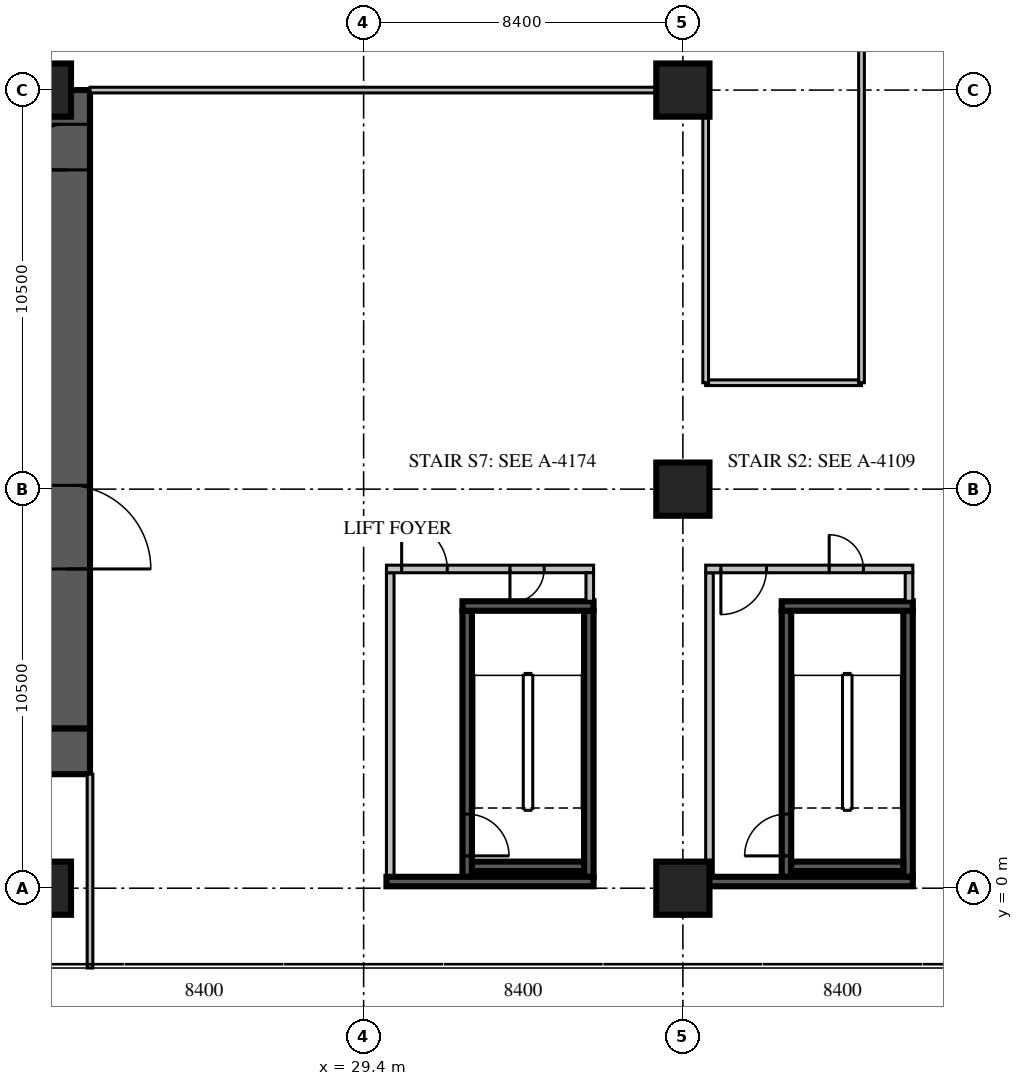
"""IFC4 building model, lengths in metres.
Left out: names, types, materials, properties, quantities, classifications, styles, units other than length and angle.
Written with IfcOpenShell. Run it as: python <this file> out.ifc"""

import sys

from ifc_helpers import new_model, si_unit, direction, frame, frame_2d, origin, origin_2d, place, context, subcontext, project, spatial, rectangle, extrude, source, transform, mapped, element, fill, save


model = new_model("IFC4")
c1 = context("Model", 3, precision=1e-05, world=origin(), true_north=direction((0.0, 1.0)))
c2 = subcontext(c1, "Body", "Model", "MODEL_VIEW")
j1 = project(units=[si_unit("LENGTHUNIT", "METRE"), si_unit("PLANEANGLEUNIT", "RADIAN")], contexts=[c1])
p1 = place(None, origin())
s1 = spatial("IfcSite", under=j1, at=p1, CompositionType="ELEMENT")
p2 = place(p1, origin())
s2 = spatial("IfcBuilding", under=s1, at=p2, CompositionType="ELEMENT")
p3 = place(p2, frame((0.0, 0.0, 12.9)))
s3 = spatial("IfcBuildingStorey", under=s2, at=p3, CompositionType="ELEMENT", Elevation=12.9)
m1 = source(origin(), c2, "Body", "SweptSolid", [
    extrude(rectangle(XDim=1.4, YDim=1.4, at=origin_2d()), origin(), (0.0, 0.0, 1.0), 5.4),
])
for number, where, z_axis, x_axis in (
    (1, (21.0, 0.0, 0.0), (0.0, 0.0, 1.0), (1.0, 0.0, 0.0)),
    (2, (21.0, 21.0, 0.0), (0.0, 0.0, 1.0), (1.0, 0.0, 0.0)),
    (3, (37.8, 0.0, 0.0), (0.0, 0.0, 1.0), (1.0, 0.0, 0.0)),
    (4, (37.8, 10.5, 0.0), (0.0, 0.0, 1.0), (1.0, 0.0, 0.0)),
    (5, (37.8, 21.0, 0.0), (0.0, 0.0, 1.0), (1.0, 0.0, 0.0)),
):
    element("IfcColumn", number, at=place(p3, frame(where, z_axis=z_axis, x_axis=x_axis)), inside=s3, PredefinedType="COLUMN", context=c2, shape_type="MappedRepresentation", body=[
        mapped(m1, transform((0.0, 0.0, 0.0), scale=1.0)),
    ])
m2 = source(origin(), c2, "Body", "SweptSolid", [
    extrude(rectangle(XDim=16.8, YDim=1.2, at=frame_2d((8.4, 0.0))), origin(), (0.0, 0.0, 1.0), 5.4),
])
p4 = place(p3, frame((21.6, 4.2, 0.0), z_axis=(0.0, 0.0, 1.0), x_axis=(0.0, 1.0, 0.0)))
e6 = element("IfcWall", 6, at=p4, inside=s3, PredefinedType="SHEAR", context=c2, shape_type="MappedRepresentation", body=[
    mapped(m2, transform((0.0, 0.0, 0.0), scale=1.0)),
])
m3 = source(origin(), c2, "Body", "SweptSolid", [
    extrude(rectangle(XDim=2.2, YDim=2.1, at=frame_2d((1.1, 1.05))), frame((0.0, 0.61, 0.0), z_axis=(0.0, -1.0, 0.0), x_axis=(1.0, 0.0, 0.0)), (0.0, 0.0, 1.0), 1.22),
])
p5 = place(p4, frame((4.2, 0.0, 0.0)))
e7 = element("IfcOpeningElement", 7, at=p5, cuts=e6, PredefinedType="OPENING", context=c2, shape_type="MappedRepresentation", body=[
    mapped(m3, transform((0.0, 0.0, 0.0), scale=1.0)),
])
m4 = source(origin(), c2, "Body", "SweptSolid", [
    extrude(rectangle(XDim=1.2, YDim=2.1, at=frame_2d((0.6, 1.05))), frame((0.0, 0.61, 0.0), z_axis=(0.0, -1.0, 0.0), x_axis=(1.0, 0.0, 0.0)), (0.0, 0.0, 1.0), 1.22),
])
p6 = place(p4, frame((14.7, 0.0, 0.0)))
e8 = element("IfcOpeningElement", 8, at=p6, cuts=e6, PredefinedType="OPENING", context=c2, shape_type="MappedRepresentation", body=[
    mapped(m4, transform((0.0, 0.0, 0.0), scale=1.0)),
])
m5 = source(origin(), c2, "Body", "SweptSolid", [
    extrude(rectangle(XDim=18.0, YDim=1.2, at=frame_2d((9.0, 0.0))), origin(), (0.0, 0.0, 1.0), 5.4),
])
p7 = place(p3, frame((4.2, 3.6, 0.0), z_axis=(0.0, 0.0, 1.0), x_axis=(1.0, 0.0, 0.0)))
e9 = element("IfcWall", 9, at=p7, inside=s3, PredefinedType="SHEAR", context=c2, shape_type="MappedRepresentation", body=[
    mapped(m5, transform((0.0, 0.0, 0.0), scale=1.0)),
])
m6 = source(origin(), c2, "Body", "SweptSolid", [
    extrude(rectangle(XDim=7.0, YDim=0.25, at=frame_2d((3.5, 0.0))), origin(), (0.0, 0.0, 1.0), 4.8),
])
p8 = place(p3, frame((40.525, 0.3, 0.0), z_axis=(0.0, 0.0, 1.0), x_axis=(0.0, 1.0, 0.0)))
e10 = element("IfcWall", 10, at=p8, inside=s3, PredefinedType="SOLIDWALL", context=c2, shape_type="MappedRepresentation", body=[
    mapped(m6, transform((0.0, 0.0, 0.0), scale=1.0)),
])
m7 = source(origin(), c2, "Body", "SweptSolid", [
    extrude(rectangle(XDim=1.1, YDim=2.1, at=frame_2d((0.55, 1.05))), frame((0.0, 0.135, 0.0), z_axis=(0.0, -1.0, 0.0), x_axis=(1.0, 0.0, 0.0)), (0.0, 0.0, 1.0), 0.27),
])
p9 = place(p8, frame((0.55, 0.0, 0.0)))
e11 = element("IfcOpeningElement", 11, at=p9, cuts=e10, PredefinedType="OPENING", context=c2, shape_type="MappedRepresentation", body=[
    mapped(m7, transform((0.0, 0.0, 0.0), scale=1.0)),
])
p10 = place(p3, frame((43.725, 0.3, 0.0), z_axis=(0.0, 0.0, 1.0), x_axis=(0.0, 1.0, 0.0)))
e12 = element("IfcWall", 12, at=p10, inside=s3, PredefinedType="SOLIDWALL", context=c2, shape_type="MappedRepresentation", body=[
    mapped(m6, transform((0.0, 0.0, 0.0), scale=1.0)),
])
m8 = source(origin(), c2, "Body", "SweptSolid", [
    extrude(rectangle(XDim=3.45, YDim=0.25, at=frame_2d((1.725, 0.0))), origin(), (0.0, 0.0, 1.0), 4.8),
])
p11 = place(p3, frame((40.4, 7.425, 0.0), z_axis=(0.0, 0.0, 1.0), x_axis=(1.0, 0.0, 0.0)))
e13 = element("IfcWall", 13, at=p11, inside=s3, PredefinedType="SOLIDWALL", context=c2, shape_type="MappedRepresentation", body=[
    mapped(m8, transform((0.0, 0.0, 0.0), scale=1.0)),
])
m9 = source(origin(), c2, "Body", "SweptSolid", [
    extrude(rectangle(XDim=2.95, YDim=0.25, at=frame_2d((1.475, 0.0))), origin(), (0.0, 0.0, 1.0), 4.8),
])
p12 = place(p3, frame((40.65, 0.575, 0.0), z_axis=(0.0, 0.0, 1.0), x_axis=(1.0, 0.0, 0.0)))
e14 = element("IfcWall", 14, at=p12, inside=s3, PredefinedType="SOLIDWALL", context=c2, shape_type="MappedRepresentation", body=[
    mapped(m9, transform((0.0, 0.0, 0.0), scale=1.0)),
])
m10 = source(origin(), c2, "Body", "SweptSolid", [
    extrude(rectangle(XDim=8.0, YDim=0.2, at=frame_2d((4.0, 0.0))), origin(), (0.0, 0.0, 1.0), 4.8),
])
p13 = place(p3, frame((38.5, 0.3, 0.0), z_axis=(0.0, 0.0, 1.0), x_axis=(0.0, 1.0, 0.0)))
e15 = element("IfcWall", 15, at=p13, inside=s3, PredefinedType="PARTITIONING", context=c2, shape_type="MappedRepresentation", body=[
    mapped(m10, transform((0.0, 0.0, 0.0), scale=1.0)),
])
m11 = source(origin(), c2, "Body", "SweptSolid", [
    extrude(rectangle(XDim=5.45, YDim=0.2, at=frame_2d((2.725, 0.0))), origin(), (0.0, 0.0, 1.0), 4.8),
])
p14 = place(p3, frame((38.4, 8.4, 0.0), z_axis=(0.0, 0.0, 1.0), x_axis=(1.0, 0.0, 0.0)))
e16 = element("IfcWall", 16, at=p14, inside=s3, PredefinedType="PARTITIONING", context=c2, shape_type="MappedRepresentation", body=[
    mapped(m11, transform((0.0, 0.0, 0.0), scale=1.0)),
])
m12 = source(origin(), c2, "Body", "SweptSolid", [
    extrude(rectangle(XDim=1.2, YDim=2.1, at=frame_2d((0.6, 1.05))), frame((0.0, 0.11, 0.0), z_axis=(0.0, -1.0, 0.0), x_axis=(1.0, 0.0, 0.0)), (0.0, 0.0, 1.0), 0.22),
])
p15 = place(p14, frame((0.4, 0.0, 0.0)))
e17 = element("IfcOpeningElement", 17, at=p15, cuts=e16, PredefinedType="OPENING", context=c2, shape_type="MappedRepresentation", body=[
    mapped(m12, transform((0.0, 0.0, 0.0), scale=1.0)),
])
m13 = source(origin(), c2, "Body", "SweptSolid", [
    extrude(rectangle(XDim=0.9, YDim=2.1, at=frame_2d((0.45, 1.05))), frame((0.0, 0.11, 0.0), z_axis=(0.0, -1.0, 0.0), x_axis=(1.0, 0.0, 0.0)), (0.0, 0.0, 1.0), 0.22),
])
p16 = place(p14, frame((3.25, 0.0, 0.0)))
e18 = element("IfcOpeningElement", 18, at=p16, cuts=e16, PredefinedType="OPENING", context=c2, shape_type="MappedRepresentation", body=[
    mapped(m13, transform((0.0, 0.0, 0.0), scale=1.0)),
])
m14 = source(origin(), c2, "Body", "SweptSolid", [
    extrude(rectangle(XDim=0.75, YDim=0.2, at=frame_2d((0.375, 0.0))), origin(), (0.0, 0.0, 1.0), 4.8),
])
p17 = place(p3, frame((43.75, 7.55, 0.0), z_axis=(0.0, 0.0, 1.0), x_axis=(0.0, 1.0, 0.0)))
e19 = element("IfcWall", 19, at=p17, inside=s3, PredefinedType="PARTITIONING", context=c2, shape_type="MappedRepresentation", body=[
    mapped(m14, transform((0.0, 0.0, 0.0), scale=1.0)),
])
m15 = source(origin(), c2, "Body", "SweptSolid", [
    extrude(rectangle(XDim=5.45, YDim=0.25, at=frame_2d((2.725, 0.0))), origin(), (0.0, 0.0, 1.0), 4.8),
])
p18 = place(p3, frame((38.4, 0.175, 0.0), z_axis=(0.0, 0.0, 1.0), x_axis=(1.0, 0.0, 0.0)))
e20 = element("IfcWall", 20, at=p18, inside=s3, PredefinedType="SOLIDWALL", context=c2, shape_type="MappedRepresentation", body=[
    mapped(m15, transform((0.0, 0.0, 0.0), scale=1.0)),
])
p19 = place(p3, frame((32.125, 0.3, 0.0), z_axis=(0.0, 0.0, 1.0), x_axis=(0.0, 1.0, 0.0)))
e21 = element("IfcWall", 21, at=p19, inside=s3, PredefinedType="SOLIDWALL", context=c2, shape_type="MappedRepresentation", body=[
    mapped(m6, transform((0.0, 0.0, 0.0), scale=1.0)),
])
p20 = place(p19, frame((0.55, 0.0, 0.0)))
e22 = element("IfcOpeningElement", 22, at=p20, cuts=e21, PredefinedType="OPENING", context=c2, shape_type="MappedRepresentation", body=[
    mapped(m7, transform((0.0, 0.0, 0.0), scale=1.0)),
])
p21 = place(p3, frame((35.325, 0.3, 0.0), z_axis=(0.0, 0.0, 1.0), x_axis=(0.0, 1.0, 0.0)))
e23 = element("IfcWall", 23, at=p21, inside=s3, PredefinedType="SOLIDWALL", context=c2, shape_type="MappedRepresentation", body=[
    mapped(m6, transform((0.0, 0.0, 0.0), scale=1.0)),
])
p22 = place(p3, frame((32.0, 7.425, 0.0), z_axis=(0.0, 0.0, 1.0), x_axis=(1.0, 0.0, 0.0)))
e24 = element("IfcWall", 24, at=p22, inside=s3, PredefinedType="SOLIDWALL", context=c2, shape_type="MappedRepresentation", body=[
    mapped(m8, transform((0.0, 0.0, 0.0), scale=1.0)),
])
p23 = place(p3, frame((32.25, 0.575, 0.0), z_axis=(0.0, 0.0, 1.0), x_axis=(1.0, 0.0, 0.0)))
e25 = element("IfcWall", 25, at=p23, inside=s3, PredefinedType="SOLIDWALL", context=c2, shape_type="MappedRepresentation", body=[
    mapped(m9, transform((0.0, 0.0, 0.0), scale=1.0)),
])
p24 = place(p3, frame((30.1, 0.3, 0.0), z_axis=(0.0, 0.0, 1.0), x_axis=(0.0, 1.0, 0.0)))
e26 = element("IfcWall", 26, at=p24, inside=s3, PredefinedType="PARTITIONING", context=c2, shape_type="MappedRepresentation", body=[
    mapped(m10, transform((0.0, 0.0, 0.0), scale=1.0)),
])
p25 = place(p3, frame((30.0, 8.4, 0.0), z_axis=(0.0, 0.0, 1.0), x_axis=(1.0, 0.0, 0.0)))
e27 = element("IfcWall", 27, at=p25, inside=s3, PredefinedType="PARTITIONING", context=c2, shape_type="MappedRepresentation", body=[
    mapped(m11, transform((0.0, 0.0, 0.0), scale=1.0)),
])
p26 = place(p25, frame((0.4, 0.0, 0.0)))
e28 = element("IfcOpeningElement", 28, at=p26, cuts=e27, PredefinedType="OPENING", context=c2, shape_type="MappedRepresentation", body=[
    mapped(m12, transform((0.0, 0.0, 0.0), scale=1.0)),
])
p27 = place(p25, frame((3.25, 0.0, 0.0)))
e29 = element("IfcOpeningElement", 29, at=p27, cuts=e27, PredefinedType="OPENING", context=c2, shape_type="MappedRepresentation", body=[
    mapped(m13, transform((0.0, 0.0, 0.0), scale=1.0)),
])
p28 = place(p3, frame((35.35, 7.55, 0.0), z_axis=(0.0, 0.0, 1.0), x_axis=(0.0, 1.0, 0.0)))
e30 = element("IfcWall", 30, at=p28, inside=s3, PredefinedType="PARTITIONING", context=c2, shape_type="MappedRepresentation", body=[
    mapped(m14, transform((0.0, 0.0, 0.0), scale=1.0)),
])
p29 = place(p3, frame((30.0, 0.175, 0.0), z_axis=(0.0, 0.0, 1.0), x_axis=(1.0, 0.0, 0.0)))
e31 = element("IfcWall", 31, at=p29, inside=s3, PredefinedType="SOLIDWALL", context=c2, shape_type="MappedRepresentation", body=[
    mapped(m15, transform((0.0, 0.0, 0.0), scale=1.0)),
])
m16 = source(origin(), c2, "Body", "SweptSolid", [
    extrude(rectangle(XDim=4.1, YDim=0.15, at=frame_2d((2.05, 0.0))), origin(), (0.0, 0.0, 1.0), 4.8),
])
p30 = place(p3, frame((38.4, 13.3, 0.0), z_axis=(0.0, 0.0, 1.0), x_axis=(1.0, 0.0, 0.0)))
e32 = element("IfcWall", 32, at=p30, inside=s3, PredefinedType="PARTITIONING", context=c2, shape_type="MappedRepresentation", body=[
    mapped(m16, transform((0.0, 0.0, 0.0), scale=1.0)),
])
m17 = source(origin(), c2, "Body", "SweptSolid", [
    extrude(rectangle(XDim=16.2, YDim=0.15, at=frame_2d((8.1, 0.0))), origin(), (0.0, 0.0, 1.0), 4.8),
])
p31 = place(p3, frame((22.2, 21.0, 0.0), z_axis=(0.0, 0.0, 1.0), x_axis=(1.0, 0.0, 0.0)))
e33 = element("IfcWall", 33, at=p31, inside=s3, PredefinedType="PARTITIONING", context=c2, shape_type="MappedRepresentation", body=[
    mapped(m17, transform((0.0, 0.0, 0.0), scale=1.0)),
])
m18 = source(origin(), c2, "Body", "SweptSolid", [
    extrude(rectangle(XDim=5.1, YDim=0.15, at=frame_2d((2.55, 0.0))), origin(), (0.0, 0.0, 1.0), 4.8),
])
p32 = place(p3, frame((22.2, -2.1, 0.0), z_axis=(0.0, 0.0, 1.0), x_axis=(0.0, 1.0, 0.0)))
e34 = element("IfcWall", 34, at=p32, inside=s3, PredefinedType="PARTITIONING", context=c2, shape_type="MappedRepresentation", body=[
    mapped(m18, transform((0.0, 0.0, 0.0), scale=1.0)),
])
m19 = source(origin(), c2, "Body", "SweptSolid", [
    extrude(rectangle(XDim=7.7, YDim=0.15, at=frame_2d((3.85, 0.0))), origin(), (0.0, 0.0, 1.0), 4.8),
])
p33 = place(p3, frame((38.4, 13.3, 0.0), z_axis=(0.0, 0.0, 1.0), x_axis=(0.0, 1.0, 0.0)))
e35 = element("IfcWall", 35, at=p33, inside=s3, PredefinedType="PARTITIONING", context=c2, shape_type="MappedRepresentation", body=[
    mapped(m19, transform((0.0, 0.0, 0.0), scale=1.0)),
])
m20 = source(origin(), c2, "Body", "SweptSolid", [
    extrude(rectangle(XDim=29.2, YDim=0.15, at=frame_2d((14.6, 0.0))), origin(), (0.0, 0.0, 1.0), 4.8),
])
p34 = place(p3, frame((42.5, 13.3, 0.0), z_axis=(0.0, 0.0, 1.0), x_axis=(0.0, 1.0, 0.0)))
e36 = element("IfcWall", 36, at=p34, inside=s3, PredefinedType="PARTITIONING", context=c2, shape_type="MappedRepresentation", body=[
    mapped(m20, transform((0.0, 0.0, 0.0), scale=1.0)),
])
m21 = source(origin(), c2, "Body", "SweptSolid", [
    extrude(rectangle(XDim=1.8, YDim=2.1, at=frame_2d((0.9, 1.05))), frame((0.0, 0.085, 0.0), z_axis=(0.0, -1.0, 0.0), x_axis=(1.0, 0.0, 0.0)), (0.0, 0.0, 1.0), 0.17),
])
p35 = place(p34, frame((13.7, 0.0, 0.0)))
e37 = element("IfcOpeningElement", 37, at=p35, cuts=e36, PredefinedType="OPENING", context=c2, shape_type="MappedRepresentation", body=[
    mapped(m21, transform((0.0, 0.0, 0.0), scale=1.0)),
])
m22 = source(origin(), c2, "Body", "SweptSolid", [
    extrude(rectangle(XDim=1.1, YDim=2.1, at=frame_2d((0.55, 1.05))), frame((0.0, 0.025, 0.0), z_axis=(0.0, -1.0, 0.0), x_axis=(1.0, 0.0, 0.0)), (0.0, 0.0, 1.0), 0.05),
])
p36 = place(p9, origin())
e38 = element("IfcDoor", 38, at=p36, inside=s3, OperationType="SINGLE_SWING_LEFT", PredefinedType="DOOR", context=c2, shape_type="MappedRepresentation", body=[
    mapped(m22, transform((0.0, 0.0, 0.0), scale=1.0)),
])
fill(e11, e38)
m23 = source(origin(), c2, "Body", "SweptSolid", [
    extrude(rectangle(XDim=1.2, YDim=2.1, at=frame_2d((0.6, 1.05))), frame((0.0, 0.025, 0.0), z_axis=(0.0, -1.0, 0.0), x_axis=(1.0, 0.0, 0.0)), (0.0, 0.0, 1.0), 0.05),
])
p37 = place(p15, origin())
e39 = element("IfcDoor", 39, at=p37, inside=s3, OperationType="SINGLE_SWING_RIGHT", PredefinedType="DOOR", context=c2, shape_type="MappedRepresentation", body=[
    mapped(m23, transform((0.0, 0.0, 0.0), scale=1.0)),
])
fill(e17, e39)
m24 = source(origin(), c2, "Body", "SweptSolid", [
    extrude(rectangle(XDim=0.9, YDim=2.1, at=frame_2d((0.45, 1.05))), frame((0.0, 0.025, 0.0), z_axis=(0.0, -1.0, 0.0), x_axis=(1.0, 0.0, 0.0)), (0.0, 0.0, 1.0), 0.05),
])
p38 = place(p16, origin())
e40 = element("IfcDoor", 40, at=p38, inside=s3, OperationType="SINGLE_SWING_LEFT", PredefinedType="DOOR", context=c2, shape_type="MappedRepresentation", body=[
    mapped(m24, transform((0.0, 0.0, 0.0), scale=1.0)),
])
fill(e18, e40)
p39 = place(p20, origin())
e41 = element("IfcDoor", 41, at=p39, inside=s3, OperationType="SINGLE_SWING_RIGHT", PredefinedType="DOOR", context=c2, shape_type="MappedRepresentation", body=[
    mapped(m22, transform((0.0, 0.0, 0.0), scale=1.0)),
])
fill(e22, e41)
p40 = place(p26, origin())
e42 = element("IfcDoor", 42, at=p40, inside=s3, OperationType="SINGLE_SWING_LEFT", PredefinedType="DOOR", context=c2, shape_type="MappedRepresentation", body=[
    mapped(m23, transform((0.0, 0.0, 0.0), scale=1.0)),
])
fill(e28, e42)
p41 = place(p27, origin())
e43 = element("IfcDoor", 43, at=p41, inside=s3, OperationType="SINGLE_SWING_RIGHT", PredefinedType="DOOR", context=c2, shape_type="MappedRepresentation", body=[
    mapped(m24, transform((0.0, 0.0, 0.0), scale=1.0)),
])
fill(e29, e43)
m25 = source(origin(), c2, "Body", "SweptSolid", [
    extrude(rectangle(XDim=2.2, YDim=2.1, at=frame_2d((1.1, 1.05))), frame((0.0, 0.025, 0.0), z_axis=(0.0, -1.0, 0.0), x_axis=(1.0, 0.0, 0.0)), (0.0, 0.0, 1.0), 0.05),
])
p42 = place(p5, origin())
e44 = element("IfcDoor", 44, at=p42, inside=s3, OperationType="DOUBLE_DOOR_SINGLE_SWING", PredefinedType="DOOR", context=c2, shape_type="MappedRepresentation", body=[
    mapped(m25, transform((0.0, 0.0, 0.0), scale=1.0)),
])
fill(e7, e44)
p43 = place(p6, origin())
e45 = element("IfcDoor", 45, at=p43, inside=s3, OperationType="SINGLE_SWING_LEFT", PredefinedType="DOOR", context=c2, shape_type="MappedRepresentation", body=[
    mapped(m23, transform((0.0, 0.0, 0.0), scale=1.0)),
])
fill(e8, e45)
save(model, sys.argv[1])
